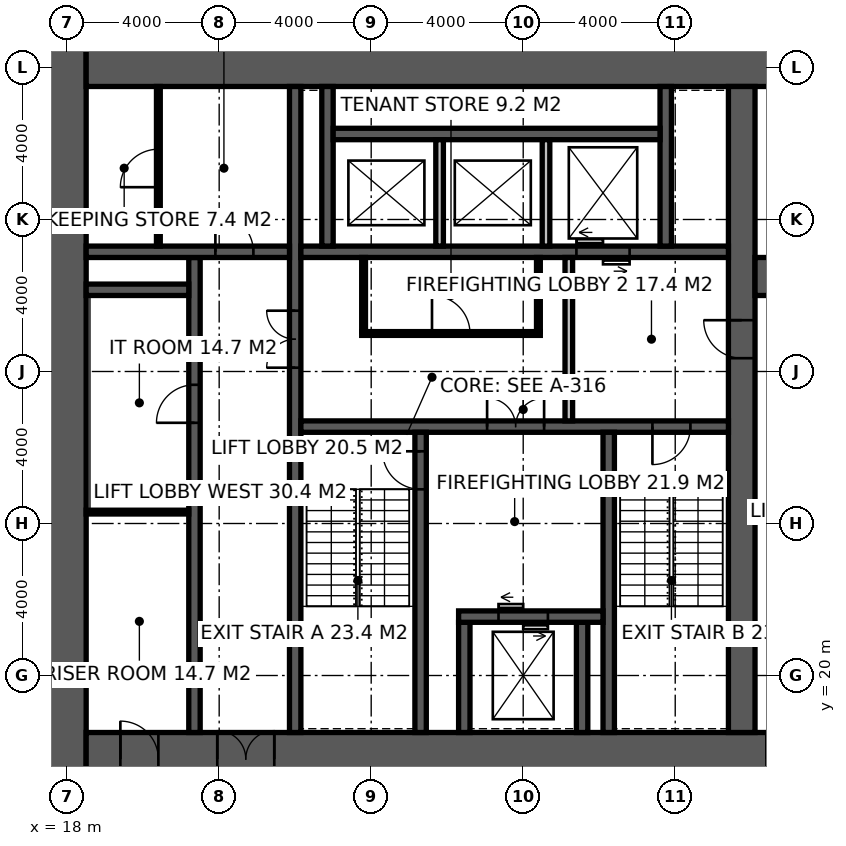
"""IFC4 building model, lengths in metres.
Left out: names, types, materials, properties, quantities, classifications, styles, units other than length and angle.
Written with IfcOpenShell. Run it as: python <this file> out.ifc"""

import sys

from ifc_helpers import new_model, si_unit, direction, frame, frame_2d, origin, place, context, subcontext, project, spatial, rectangle, extrude, element, fill, save


model = new_model("IFC4")
c1 = context("Model", 3, precision=1e-05, world=origin(), true_north=direction((0.0, 1.0)))
c2 = subcontext(c1, "Body", "Model", "MODEL_VIEW")
j1 = project(units=[si_unit("LENGTHUNIT", "METRE"), si_unit("PLANEANGLEUNIT", "RADIAN")], contexts=[c1])
p1 = place(None, origin())
s1 = spatial("IfcSite", under=j1, at=p1, CompositionType="ELEMENT")
p2 = place(p1, origin())
s2 = spatial("IfcBuilding", under=s1, at=p2, CompositionType="ELEMENT")
p3 = place(p2, frame((0.0, 0.0, 59.0)))
s3 = spatial("IfcBuildingStorey", under=s2, at=p3, CompositionType="ELEMENT", Elevation=59.0)
p4 = place(p3, frame((18.0, 17.1, -0.15), z_axis=(0.0, 0.0, 1.0), x_axis=(0.0, 1.0, 0.0)))
e1 = element("IfcWall", 1, at=p4, inside=s3, PredefinedType="SHEAR", context=c2, shape_type="SweptSolid", body=[
    extrude(rectangle(XDim=19.8, YDim=1.0, at=frame_2d((9.9, 0.0))), origin(), (0.0, 0.0, 1.0), 4.0),
])
p5 = place(p3, frame((18.5, 17.8, -0.15), z_axis=(0.0, 0.0, 1.0), x_axis=(1.0, 0.0, 0.0)))
e2 = element("IfcWall", 2, at=p5, inside=s3, PredefinedType="SHEAR", context=c2, shape_type="SweptSolid", body=[
    extrude(rectangle(XDim=23.7, YDim=1.4, at=frame_2d((11.85, 0.0))), origin(), (0.0, 0.0, 1.0), 4.0),
])
p6 = place(p5, frame((3.45, 0.0, 0.15)))
e3 = element("IfcOpeningElement", 3, at=p6, cuts=e2, PredefinedType="OPENING", context=c2, shape_type="SweptSolid", body=[
    extrude(rectangle(XDim=1.5, YDim=2.4, at=frame_2d((0.75, 1.2))), frame((0.0, 0.71, 0.0), z_axis=(0.0, -1.0, 0.0), x_axis=(1.0, 0.0, 0.0)), (0.0, 0.0, 1.0), 1.42),
])
p7 = place(p5, frame((17.9, 0.0, 0.15)))
e4 = element("IfcOpeningElement", 4, at=p7, cuts=e2, PredefinedType="OPENING", context=c2, shape_type="SweptSolid", body=[
    extrude(rectangle(XDim=1.5, YDim=2.4, at=frame_2d((0.75, 1.2))), frame((0.0, 0.71, 0.0), z_axis=(0.0, -1.0, 0.0), x_axis=(1.0, 0.0, 0.0)), (0.0, 0.0, 1.0), 1.42),
])
p8 = place(p5, frame((0.9, 0.0, 0.15)))
e5 = element("IfcOpeningElement", 5, at=p8, cuts=e2, PredefinedType="OPENING", context=c2, shape_type="SweptSolid", body=[
    extrude(rectangle(XDim=1.0, YDim=2.2, at=frame_2d((0.5, 1.1))), frame((0.0, 0.71, 0.0), z_axis=(0.0, -1.0, 0.0), x_axis=(1.0, 0.0, 0.0)), (0.0, 0.0, 1.0), 1.42),
])
p9 = place(p3, frame((18.5, 36.2, -0.15), z_axis=(0.0, 0.0, 1.0), x_axis=(1.0, 0.0, 0.0)))
e6 = element("IfcWall", 6, at=p9, inside=s3, PredefinedType="SHEAR", context=c2, shape_type="SweptSolid", body=[
    extrude(rectangle(XDim=23.7, YDim=1.4, at=frame_2d((11.85, 0.0))), origin(), (0.0, 0.0, 1.0), 4.0),
])
p10 = place(p3, frame((35.75, 18.5, -0.15), z_axis=(0.0, 0.0, 1.0), x_axis=(0.0, 1.0, 0.0)))
e7 = element("IfcWall", 7, at=p10, inside=s3, PredefinedType="SHEAR", context=c2, shape_type="SweptSolid", body=[
    extrude(rectangle(XDim=17.0, YDim=0.7, at=frame_2d((8.5, 0.0))), origin(), (0.0, 0.0, 1.0), 4.0),
])
p11 = place(p10, frame((9.85, 0.0, 0.15)))
e8 = element("IfcOpeningElement", 8, at=p11, cuts=e7, PredefinedType="OPENING", context=c2, shape_type="SweptSolid", body=[
    extrude(rectangle(XDim=1.0, YDim=2.2, at=frame_2d((0.5, 1.1))), frame((0.0, 0.36, 0.0), z_axis=(0.0, -1.0, 0.0), x_axis=(1.0, 0.0, 0.0)), (0.0, 0.0, 1.0), 0.72),
])
p12 = place(p3, frame((24.0, 18.5, -0.15), z_axis=(0.0, 0.0, 1.0), x_axis=(0.0, 1.0, 0.0)))
e9 = element("IfcWall", 9, at=p12, inside=s3, PredefinedType="SHEAR", context=c2, shape_type="SweptSolid", body=[
    extrude(rectangle(XDim=17.0, YDim=0.3, at=frame_2d((8.5, 0.0))), origin(), (0.0, 0.0, 1.0), 4.0),
])
p13 = place(p12, frame((9.6, 0.0, 0.15)))
e10 = element("IfcOpeningElement", 10, at=p13, cuts=e9, PredefinedType="OPENING", context=c2, shape_type="SweptSolid", body=[
    extrude(rectangle(XDim=1.5, YDim=2.4, at=frame_2d((0.75, 1.2))), frame((0.0, 0.16, 0.0), z_axis=(0.0, -1.0, 0.0), x_axis=(1.0, 0.0, 0.0)), (0.0, 0.0, 1.0), 0.32),
])
p14 = place(p3, frame((24.15, 26.55, -0.15), z_axis=(0.0, 0.0, 1.0), x_axis=(1.0, 0.0, 0.0)))
e11 = element("IfcWall", 11, at=p14, inside=s3, PredefinedType="SHEAR", context=c2, shape_type="SweptSolid", body=[
    extrude(rectangle(XDim=11.25, YDim=0.3, at=frame_2d((5.625, 0.0))), origin(), (0.0, 0.0, 1.0), 4.0),
])
p15 = place(p14, frame((9.25, 0.0, 0.15)))
e12 = element("IfcOpeningElement", 12, at=p15, cuts=e11, PredefinedType="OPENING", context=c2, shape_type="SweptSolid", body=[
    extrude(rectangle(XDim=1.0, YDim=2.2, at=frame_2d((0.5, 1.1))), frame((0.0, 0.16, 0.0), z_axis=(0.0, -1.0, 0.0), x_axis=(1.0, 0.0, 0.0)), (0.0, 0.0, 1.0), 0.32),
])
p16 = place(p14, frame((4.9, 0.0, 0.15)))
e13 = element("IfcOpeningElement", 13, at=p16, cuts=e11, PredefinedType="OPENING", context=c2, shape_type="SweptSolid", body=[
    extrude(rectangle(XDim=1.5, YDim=2.4, at=frame_2d((0.75, 1.2))), frame((0.0, 0.16, 0.0), z_axis=(0.0, -1.0, 0.0), x_axis=(1.0, 0.0, 0.0)), (0.0, 0.0, 1.0), 0.32),
])
p17 = place(p3, frame((27.3, 18.5, -0.15), z_axis=(0.0, 0.0, 1.0), x_axis=(0.0, 1.0, 0.0)))
e14 = element("IfcWall", 14, at=p17, inside=s3, PredefinedType="SHEAR", context=c2, shape_type="SweptSolid", body=[
    extrude(rectangle(XDim=7.9, YDim=0.3, at=frame_2d((3.95, 0.0))), origin(), (0.0, 0.0, 1.0), 4.0),
])
p18 = place(p17, frame((6.4, 0.0, 0.15)))
e15 = element("IfcOpeningElement", 15, at=p18, cuts=e14, PredefinedType="OPENING", context=c2, shape_type="SweptSolid", body=[
    extrude(rectangle(XDim=1.0, YDim=2.2, at=frame_2d((0.5, 1.1))), frame((0.0, 0.16, 0.0), z_axis=(0.0, -1.0, 0.0), x_axis=(1.0, 0.0, 0.0)), (0.0, 0.0, 1.0), 0.32),
])
p19 = place(p3, frame((32.25, 18.5, -0.15), z_axis=(0.0, 0.0, 1.0), x_axis=(0.0, 1.0, 0.0)))
e16 = element("IfcWall", 16, at=p19, inside=s3, PredefinedType="SHEAR", context=c2, shape_type="SweptSolid", body=[
    extrude(rectangle(XDim=7.9, YDim=0.3, at=frame_2d((3.95, 0.0))), origin(), (0.0, 0.0, 1.0), 4.0),
])
for number, where, z_axis, x_axis in (
    (17, (28.45, 18.5, -0.15), (0.0, 0.0, 1.0), (0.0, 1.0, 0.0)),
    (18, (31.55, 18.5, -0.15), (0.0, 0.0, 1.0), (0.0, 1.0, 0.0)),
):
    element("IfcWall", number, at=place(p3, frame(where, z_axis=z_axis, x_axis=x_axis)), inside=s3, PredefinedType="SHEAR", context=c2, shape_type="SweptSolid", body=[
        extrude(rectangle(XDim=2.9, YDim=0.3, at=frame_2d((1.45, 0.0))), origin(), (0.0, 0.0, 1.0), 4.0),
    ])
p20 = place(p3, frame((28.3, 21.55, -0.15), z_axis=(0.0, 0.0, 1.0), x_axis=(1.0, 0.0, 0.0)))
e19 = element("IfcWall", 19, at=p20, inside=s3, PredefinedType="SHEAR", context=c2, shape_type="SweptSolid", body=[
    extrude(rectangle(XDim=3.8, YDim=0.3, at=frame_2d((1.9, 0.0))), origin(), (0.0, 0.0, 1.0), 4.0),
])
p21 = place(p20, frame((1.05, 0.0, 0.15)))
e20 = element("IfcOpeningElement", 20, at=p21, cuts=e19, PredefinedType="OPENING", context=c2, shape_type="SweptSolid", body=[
    extrude(rectangle(XDim=1.3, YDim=2.4, at=frame_2d((0.65, 1.2))), frame((0.0, 0.16, 0.0), z_axis=(0.0, -1.0, 0.0), x_axis=(1.0, 0.0, 0.0)), (0.0, 0.0, 1.0), 0.32),
])
p22 = place(p3, frame((24.15, 31.15, -0.15), z_axis=(0.0, 0.0, 1.0), x_axis=(1.0, 0.0, 0.0)))
e21 = element("IfcWall", 21, at=p22, inside=s3, PredefinedType="SHEAR", context=c2, shape_type="SweptSolid", body=[
    extrude(rectangle(XDim=11.25, YDim=0.3, at=frame_2d((5.625, 0.0))), origin(), (0.0, 0.0, 1.0), 4.0),
])
p23 = place(p22, frame((7.25, 0.0, 0.15)))
e22 = element("IfcOpeningElement", 22, at=p23, cuts=e21, PredefinedType="OPENING", context=c2, shape_type="SweptSolid", body=[
    extrude(rectangle(XDim=1.4, YDim=2.4, at=frame_2d((0.7, 1.2))), frame((0.0, 0.16, 0.0), z_axis=(0.0, -1.0, 0.0), x_axis=(1.0, 0.0, 0.0)), (0.0, 0.0, 1.0), 0.32),
])
p24 = place(p3, frame((21.35, 18.5, -0.15), z_axis=(0.0, 0.0, 1.0), x_axis=(0.0, 1.0, 0.0)))
e23 = element("IfcWall", 23, at=p24, inside=s3, PredefinedType="SHEAR", context=c2, shape_type="SweptSolid", body=[
    extrude(rectangle(XDim=12.5, YDim=0.3, at=frame_2d((6.25, 0.0))), origin(), (0.0, 0.0, 1.0), 4.0),
])
p25 = place(p24, frame((8.15, 0.0, 0.15)))
e24 = element("IfcOpeningElement", 24, at=p25, cuts=e23, PredefinedType="OPENING", context=c2, shape_type="SweptSolid", body=[
    extrude(rectangle(XDim=1.0, YDim=2.2, at=frame_2d((0.5, 1.1))), frame((0.0, 0.16, 0.0), z_axis=(0.0, -1.0, 0.0), x_axis=(1.0, 0.0, 0.0)), (0.0, 0.0, 1.0), 0.32),
])
p26 = place(p3, frame((18.5, 31.15, -0.15), z_axis=(0.0, 0.0, 1.0), x_axis=(1.0, 0.0, 0.0)))
e25 = element("IfcWall", 25, at=p26, inside=s3, PredefinedType="SHEAR", context=c2, shape_type="SweptSolid", body=[
    extrude(rectangle(XDim=5.35, YDim=0.3, at=frame_2d((2.675, 0.0))), origin(), (0.0, 0.0, 1.0), 4.0),
])
p27 = place(p26, frame((3.4, 0.0, 0.15)))
e26 = element("IfcOpeningElement", 26, at=p27, cuts=e25, PredefinedType="OPENING", context=c2, shape_type="SweptSolid", body=[
    extrude(rectangle(XDim=1.0, YDim=2.2, at=frame_2d((0.5, 1.1))), frame((0.0, 0.16, 0.0), z_axis=(0.0, -1.0, 0.0), x_axis=(1.0, 0.0, 0.0)), (0.0, 0.0, 1.0), 0.32),
])
p28 = place(p3, frame((18.5, 30.15, -0.15), z_axis=(0.0, 0.0, 1.0), x_axis=(1.0, 0.0, 0.0)))
e27 = element("IfcWall", 27, at=p28, inside=s3, PredefinedType="SHEAR", context=c2, shape_type="SweptSolid", body=[
    extrude(rectangle(XDim=2.7, YDim=0.3, at=frame_2d((1.35, 0.0))), origin(), (0.0, 0.0, 1.0), 4.0),
])
for number, where, z_axis, x_axis in (
    (28, (24.85, 31.3, -0.15), (0.0, 0.0, 1.0), (0.0, 1.0, 0.0)),
    (29, (33.75, 31.3, -0.15), (0.0, 0.0, 1.0), (0.0, 1.0, 0.0)),
):
    element("IfcWall", number, at=place(p3, frame(where, z_axis=z_axis, x_axis=x_axis)), inside=s3, PredefinedType="SHEAR", context=c2, shape_type="SweptSolid", body=[
        extrude(rectangle(XDim=4.2, YDim=0.3, at=frame_2d((2.1, 0.0))), origin(), (0.0, 0.0, 1.0), 4.0),
    ])
p29 = place(p3, frame((25.0, 34.25, -0.15), z_axis=(0.0, 0.0, 1.0), x_axis=(1.0, 0.0, 0.0)))
e30 = element("IfcWall", 30, at=p29, inside=s3, PredefinedType="SHEAR", context=c2, shape_type="SweptSolid", body=[
    extrude(rectangle(XDim=8.6, YDim=0.3, at=frame_2d((4.3, 0.0))), origin(), (0.0, 0.0, 1.0), 4.0),
])
for number, where, z_axis, x_axis in (
    (31, (27.8, 31.3, -0.15), (0.0, 0.0, 1.0), (0.0, 1.0, 0.0)),
    (32, (30.6, 31.3, -0.15), (0.0, 0.0, 1.0), (0.0, 1.0, 0.0)),
):
    element("IfcWall", number, at=place(p3, frame(where, z_axis=z_axis, x_axis=x_axis)), inside=s3, PredefinedType="SOLIDWALL", context=c2, shape_type="SweptSolid", body=[
        extrude(rectangle(XDim=2.8, YDim=0.2, at=frame_2d((1.4, 0.0))), origin(), (0.0, 0.0, 1.0), 4.0),
    ])
p30 = place(p3, frame((36.1, 30.5, -0.15), z_axis=(0.0, 0.0, 1.0), x_axis=(1.0, 0.0, 0.0)))
e33 = element("IfcWall", 33, at=p30, inside=s3, PredefinedType="SHEAR", context=c2, shape_type="SweptSolid", body=[
    extrude(rectangle(XDim=6.1, YDim=1.0, at=frame_2d((3.05, 0.0))), origin(), (0.0, 0.0, 1.0), 4.0),
])
p31 = place(p30, frame((0.6, 0.0, 0.15)))
e34 = element("IfcOpeningElement", 34, at=p31, cuts=e33, PredefinedType="OPENING", context=c2, shape_type="SweptSolid", body=[
    extrude(rectangle(XDim=1.0, YDim=2.2, at=frame_2d((0.5, 1.1))), frame((0.0, 0.51, 0.0), z_axis=(0.0, -1.0, 0.0), x_axis=(1.0, 0.0, 0.0)), (0.0, 0.0, 1.0), 1.02),
])
p32 = place(p3, frame((31.2, 26.7, 0.0), z_axis=(0.0, 0.0, 1.0), x_axis=(0.0, 1.0, 0.0)))
e35 = element("IfcWall", 35, at=p32, inside=s3, PredefinedType="SOLIDWALL", context=c2, shape_type="SweptSolid", body=[
    extrude(rectangle(XDim=4.3, YDim=0.2, at=frame_2d((2.15, 0.0))), origin(), (0.0, 0.0, 1.0), 3.85),
])
p33 = place(p3, frame((20.4, 31.3, 0.0), z_axis=(0.0, 0.0, 1.0), x_axis=(0.0, 1.0, 0.0)))
e36 = element("IfcWall", 36, at=p33, inside=s3, PredefinedType="PARTITIONING", context=c2, shape_type="SweptSolid", body=[
    extrude(rectangle(XDim=4.2, YDim=0.1, at=frame_2d((2.1, 0.0))), origin(), (0.0, 0.0, 1.0), 3.85),
])
p34 = place(p33, frame((1.55, 0.0, 0.0)))
e37 = element("IfcOpeningElement", 37, at=p34, cuts=e36, PredefinedType="OPENING", context=c2, shape_type="SweptSolid", body=[
    extrude(rectangle(XDim=1.0, YDim=2.2, at=frame_2d((0.5, 1.1))), frame((0.0, 0.06, 0.0), z_axis=(0.0, -1.0, 0.0), x_axis=(1.0, 0.0, 0.0)), (0.0, 0.0, 1.0), 0.12),
])
p35 = place(p3, frame((25.75, 29.0, 0.0), z_axis=(0.0, 0.0, 1.0), x_axis=(1.0, 0.0, 0.0)))
e38 = element("IfcWall", 38, at=p35, inside=s3, PredefinedType="PARTITIONING", context=c2, shape_type="SweptSolid", body=[
    extrude(rectangle(XDim=4.7, YDim=0.1, at=frame_2d((2.35, 0.0))), origin(), (0.0, 0.0, 1.0), 3.85),
])
p36 = place(p35, frame((1.85, 0.0, 0.0)))
e39 = element("IfcOpeningElement", 39, at=p36, cuts=e38, PredefinedType="OPENING", context=c2, shape_type="SweptSolid", body=[
    extrude(rectangle(XDim=1.0, YDim=2.2, at=frame_2d((0.5, 1.1))), frame((0.0, 0.06, 0.0), z_axis=(0.0, -1.0, 0.0), x_axis=(1.0, 0.0, 0.0)), (0.0, 0.0, 1.0), 0.12),
])
for number, where, z_axis, x_axis in (
    (40, (25.8, 29.05, 0.0), (0.0, 0.0, 1.0), (0.0, 1.0, 0.0)),
    (41, (30.4, 29.05, 0.0), (0.0, 0.0, 1.0), (0.0, 1.0, 0.0)),
):
    element("IfcWall", number, at=place(p3, frame(where, z_axis=z_axis, x_axis=x_axis)), inside=s3, PredefinedType="PARTITIONING", context=c2, shape_type="SweptSolid", body=[
        extrude(rectangle(XDim=1.95, YDim=0.1, at=frame_2d((0.975, 0.0))), origin(), (0.0, 0.0, 1.0), 3.85),
    ])
p37 = place(p3, frame((18.5, 24.3, 0.0), z_axis=(0.0, 0.0, 1.0), x_axis=(1.0, 0.0, 0.0)))
e42 = element("IfcWall", 42, at=p37, inside=s3, PredefinedType="PARTITIONING", context=c2, shape_type="SweptSolid", body=[
    extrude(rectangle(XDim=2.7, YDim=0.1, at=frame_2d((1.35, 0.0))), origin(), (0.0, 0.0, 1.0), 3.85),
])
p38 = place(p18, origin())
e43 = element("IfcDoor", 43, at=p38, inside=s3, OperationType="SINGLE_SWING_RIGHT", PredefinedType="DOOR", context=c2, shape_type="SweptSolid", body=[
    extrude(rectangle(XDim=1.0, YDim=2.2, at=frame_2d((0.5, 1.1))), frame((0.0, 0.025, 0.0), z_axis=(0.0, -1.0, 0.0), x_axis=(1.0, 0.0, 0.0)), (0.0, 0.0, 1.0), 0.05),
])
fill(e15, e43)
p39 = place(p15, frame((1.0, 0.0, 0.0), z_axis=(0.0, 0.0, 1.0), x_axis=(-1.0, 0.0, 0.0)))
e44 = element("IfcDoor", 44, at=p39, inside=s3, OperationType="SINGLE_SWING_RIGHT", PredefinedType="DOOR", context=c2, shape_type="SweptSolid", body=[
    extrude(rectangle(XDim=1.0, YDim=2.2, at=frame_2d((0.5, 1.1))), frame((0.0, 0.025, 0.0), z_axis=(0.0, -1.0, 0.0), x_axis=(1.0, 0.0, 0.0)), (0.0, 0.0, 1.0), 0.05),
])
fill(e12, e44)
p40 = place(p11, origin())
e45 = element("IfcDoor", 45, at=p40, inside=s3, OperationType="SINGLE_SWING_RIGHT", PredefinedType="DOOR", context=c2, shape_type="SweptSolid", body=[
    extrude(rectangle(XDim=1.0, YDim=2.2, at=frame_2d((0.5, 1.1))), frame((0.0, 0.025, 0.0), z_axis=(0.0, -1.0, 0.0), x_axis=(1.0, 0.0, 0.0)), (0.0, 0.0, 1.0), 0.05),
])
fill(e8, e45)
p41 = place(p16, origin())
e46 = element("IfcDoor", 46, at=p41, inside=s3, OperationType="DOUBLE_DOOR_DOUBLE_SWING", PredefinedType="DOOR", context=c2, shape_type="SweptSolid", body=[
    extrude(rectangle(XDim=1.5, YDim=2.4, at=frame_2d((0.75, 1.2))), frame((0.0, 0.025, 0.0), z_axis=(0.0, -1.0, 0.0), x_axis=(1.0, 0.0, 0.0)), (0.0, 0.0, 1.0), 0.05),
])
fill(e13, e46)
p42 = place(p13, origin())
e47 = element("IfcDoor", 47, at=p42, inside=s3, OperationType="DOUBLE_DOOR_DOUBLE_SWING", PredefinedType="DOOR", context=c2, shape_type="SweptSolid", body=[
    extrude(rectangle(XDim=1.5, YDim=2.4, at=frame_2d((0.75, 1.2))), frame((0.0, 0.025, 0.0), z_axis=(0.0, -1.0, 0.0), x_axis=(1.0, 0.0, 0.0)), (0.0, 0.0, 1.0), 0.05),
])
fill(e10, e47)
p43 = place(p27, origin())
e48 = element("IfcDoor", 48, at=p43, inside=s3, OperationType="SINGLE_SWING_LEFT", PredefinedType="DOOR", context=c2, shape_type="SweptSolid", body=[
    extrude(rectangle(XDim=1.0, YDim=2.2, at=frame_2d((0.5, 1.1))), frame((0.0, 0.025, 0.0), z_axis=(0.0, -1.0, 0.0), x_axis=(1.0, 0.0, 0.0)), (0.0, 0.0, 1.0), 0.05),
])
fill(e26, e48)
p44 = place(p34, origin())
e49 = element("IfcDoor", 49, at=p44, inside=s3, OperationType="SINGLE_SWING_LEFT", PredefinedType="DOOR", context=c2, shape_type="SweptSolid", body=[
    extrude(rectangle(XDim=1.0, YDim=2.2, at=frame_2d((0.5, 1.1))), frame((0.0, 0.025, 0.0), z_axis=(0.0, -1.0, 0.0), x_axis=(1.0, 0.0, 0.0)), (0.0, 0.0, 1.0), 0.05),
])
fill(e37, e49)
p45 = place(p36, origin())
e50 = element("IfcDoor", 50, at=p45, inside=s3, OperationType="SINGLE_SWING_LEFT", PredefinedType="DOOR", context=c2, shape_type="SweptSolid", body=[
    extrude(rectangle(XDim=1.0, YDim=2.2, at=frame_2d((0.5, 1.1))), frame((0.0, 0.025, 0.0), z_axis=(0.0, -1.0, 0.0), x_axis=(1.0, 0.0, 0.0)), (0.0, 0.0, 1.0), 0.05),
])
fill(e39, e50)
p46 = place(p25, origin())
e51 = element("IfcDoor", 51, at=p46, inside=s3, OperationType="SINGLE_SWING_LEFT", PredefinedType="DOOR", context=c2, shape_type="SweptSolid", body=[
    extrude(rectangle(XDim=1.0, YDim=2.2, at=frame_2d((0.5, 1.1))), frame((0.0, 0.025, 0.0), z_axis=(0.0, -1.0, 0.0), x_axis=(1.0, 0.0, 0.0)), (0.0, 0.0, 1.0), 0.05),
])
fill(e24, e51)
p47 = place(p6, origin())
e52 = element("IfcDoor", 52, at=p47, inside=s3, OperationType="DOUBLE_DOOR_DOUBLE_SWING", PredefinedType="DOOR", context=c2, shape_type="SweptSolid", body=[
    extrude(rectangle(XDim=1.5, YDim=2.4, at=frame_2d((0.75, 1.2))), frame((0.0, 0.025, 0.0), z_axis=(0.0, -1.0, 0.0), x_axis=(1.0, 0.0, 0.0)), (0.0, 0.0, 1.0), 0.05),
])
fill(e3, e52)
p48 = place(p8, origin())
e53 = element("IfcDoor", 53, at=p48, inside=s3, OperationType="SINGLE_SWING_LEFT", PredefinedType="DOOR", context=c2, shape_type="SweptSolid", body=[
    extrude(rectangle(XDim=1.0, YDim=2.2, at=frame_2d((0.5, 1.1))), frame((0.0, 0.025, 0.0), z_axis=(0.0, -1.0, 0.0), x_axis=(1.0, 0.0, 0.0)), (0.0, 0.0, 1.0), 0.05),
])
fill(e5, e53)
p49 = place(p21, origin())
e54 = element("IfcDoor", 54, at=p49, inside=s3, OperationType="DOUBLE_DOOR_SLIDING", PredefinedType="DOOR", context=c2, shape_type="SweptSolid", body=[
    extrude(rectangle(XDim=1.3, YDim=2.4, at=frame_2d((0.65, 1.2))), frame((0.0, 0.025, 0.0), z_axis=(0.0, -1.0, 0.0), x_axis=(1.0, 0.0, 0.0)), (0.0, 0.0, 1.0), 0.05),
])
fill(e20, e54)
p50 = place(p23, origin())
e55 = element("IfcDoor", 55, at=p50, inside=s3, OperationType="DOUBLE_DOOR_SLIDING", PredefinedType="DOOR", context=c2, shape_type="SweptSolid", body=[
    extrude(rectangle(XDim=1.4, YDim=2.4, at=frame_2d((0.7, 1.2))), frame((0.0, 0.025, 0.0), z_axis=(0.0, -1.0, 0.0), x_axis=(1.0, 0.0, 0.0)), (0.0, 0.0, 1.0), 0.05),
])
fill(e22, e55)
save(model, sys.argv[1])
